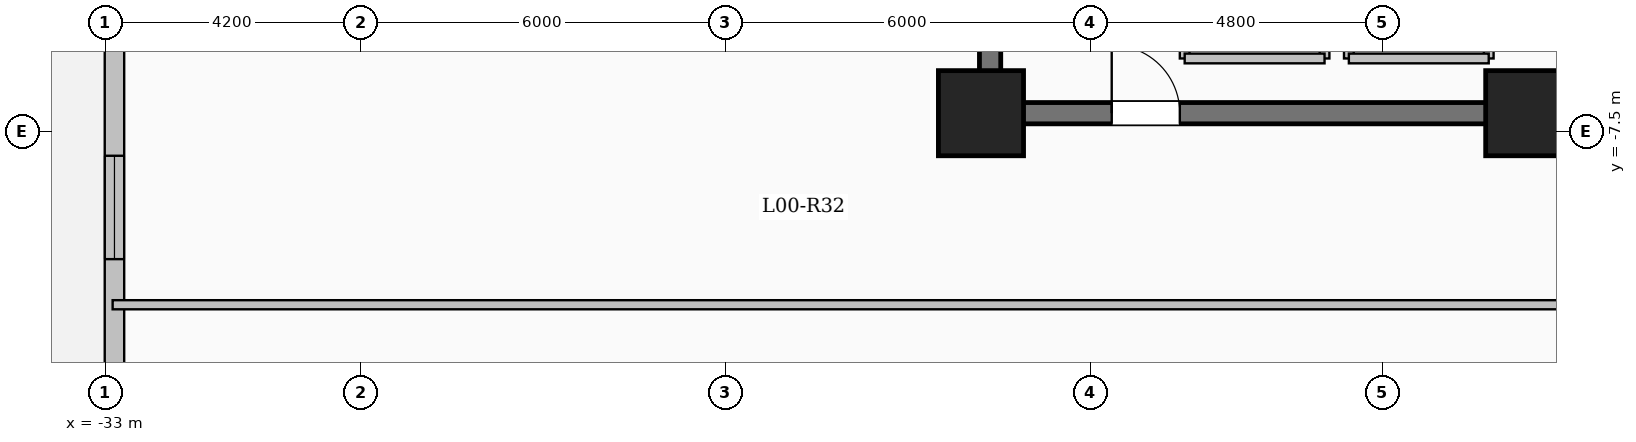
"""IFC4 building model, lengths in metres.
Left out: names, types, materials, properties, quantities, classifications, styles, units other than length and angle.
Written with IfcOpenShell. Run it as: python <this file> out.ifc"""

import sys

from ifc_helpers import new_model, si_unit, direction, frame, frame_2d, origin, origin_2d, place, context, subcontext, project, spatial, rectangle, extrude, element, fill, save


model = new_model("IFC4")
c1 = context("Model", 3, precision=1e-05, world=origin(), true_north=direction((0.0, 1.0)))
c2 = subcontext(c1, "Body", "Model", "MODEL_VIEW")
j1 = project(units=[si_unit("LENGTHUNIT", "METRE"), si_unit("PLANEANGLEUNIT", "RADIAN")], contexts=[c1])
p1 = place(None, origin())
s1 = spatial("IfcSite", under=j1, at=p1, CompositionType="ELEMENT")
p2 = place(p1, origin())
s2 = spatial("IfcBuilding", under=s1, at=p2, CompositionType="ELEMENT")
p3 = place(p2, origin())
s3 = spatial("IfcBuildingStorey", under=s2, at=p3, CompositionType="ELEMENT", Elevation=0.0)
for number, where, z_axis, x_axis in (
    (1, (-9.6, -7.2, 0.0), (0.0, 0.0, 1.0), (1.0, 0.0, 0.0)),
    (2, (-18.6, -7.2, 0.0), (0.0, 0.0, 1.0), (1.0, 0.0, 0.0)),
):
    element("IfcColumn", number, at=place(p3, frame(where, z_axis=z_axis, x_axis=x_axis)), inside=s3, PredefinedType="COLUMN", context=c2, shape_type="SweptSolid", body=[
        extrude(rectangle(XDim=1.4, YDim=1.4, at=origin_2d()), origin(), (0.0, 0.0, 1.0), 5.4),
    ])
p4 = place(p3, frame((-32.85, -29.85, 0.0), z_axis=(0.0, 0.0, 1.0), x_axis=(0.0, 1.0, 0.0)))
e3 = element("IfcWall", 3, at=p4, inside=s3, PredefinedType="SOLIDWALL", context=c2, shape_type="SweptSolid", body=[
    extrude(rectangle(XDim=59.7, YDim=0.32, at=frame_2d((29.85, 0.0))), origin(), (0.0, 0.0, 1.0), 5.1),
])
p5 = place(p4, frame((40.8, 0.0, 0.0)))
e4 = element("IfcOpeningElement", 4, at=p5, cuts=e3, PredefinedType="OPENING", context=c2, shape_type="SweptSolid", body=[
    extrude(rectangle(XDim=1.35, YDim=2.2, at=frame_2d((0.675, 1.1))), frame((0.0, 0.17, 0.0), z_axis=(0.0, -1.0, 0.0), x_axis=(1.0, 0.0, 0.0)), (0.0, 0.0, 1.0), 0.34),
])
p6 = place(p4, frame((0.55, 0.0, 0.0)))
e5 = element("IfcOpeningElement", 5, at=p6, cuts=e3, PredefinedType="OPENING", context=c2, shape_type="SweptSolid", body=[
    extrude(rectangle(XDim=6.4, YDim=3.5, at=frame_2d((3.2, 1.75))), frame((0.0, 0.17, 0.0), z_axis=(0.0, -1.0, 0.0), x_axis=(1.0, 0.0, 0.0)), (0.0, 0.0, 1.0), 0.34),
])
p7 = place(p4, frame((48.35, 0.0, 0.0)))
e6 = element("IfcOpeningElement", 6, at=p7, cuts=e3, PredefinedType="OPENING", context=c2, shape_type="SweptSolid", body=[
    extrude(rectangle(XDim=2.0, YDim=2.4, at=frame_2d((1.0, 1.2))), frame((0.0, 0.17, 0.0), z_axis=(0.0, -1.0, 0.0), x_axis=(1.0, 0.0, 0.0)), (0.0, 0.0, 1.0), 0.34),
])
p8 = place(p4, frame((20.25, 0.0, 0.9)))
e7 = element("IfcOpeningElement", 7, at=p8, cuts=e3, PredefinedType="OPENING", context=c2, shape_type="SweptSolid", body=[
    extrude(rectangle(XDim=1.7, YDim=1.9, at=frame_2d((0.85, 0.95))), frame((0.0, 0.17, 0.0), z_axis=(0.0, -1.0, 0.0), x_axis=(1.0, 0.0, 0.0)), (0.0, 0.0, 1.0), 0.34),
])
p9 = place(p4, frame((53.985, 0.0, 0.9)))
e8 = element("IfcOpeningElement", 8, at=p9, cuts=e3, PredefinedType="OPENING", context=c2, shape_type="SweptSolid", body=[
    extrude(rectangle(XDim=2.1, YDim=2.0, at=frame_2d((1.05, 1.0))), frame((0.0, 0.17, 0.0), z_axis=(0.0, -1.0, 0.0), x_axis=(1.0, 0.0, 0.0)), (0.0, 0.0, 1.0), 0.34),
])
p10 = place(p3, frame((-12.55, -6.3, 0.0), z_axis=(0.0, 0.0, 1.0), x_axis=(0.0, 1.0, 0.0)))
e9 = element("IfcWall", 9, at=p10, inside=s3, PredefinedType="SOLIDWALL", context=c2, shape_type="SweptSolid", body=[
    extrude(rectangle(XDim=2.6, YDim=0.16, at=frame_2d((1.3, 0.0))), origin(), (0.0, 0.0, 1.0), 5.1),
])
p11 = place(p3, frame((-10.25, -6.3, 0.0), z_axis=(0.0, 0.0, 1.0), x_axis=(0.0, 1.0, 0.0)))
e10 = element("IfcWall", 10, at=p11, inside=s3, PredefinedType="SOLIDWALL", context=c2, shape_type="SweptSolid", body=[
    extrude(rectangle(XDim=2.6, YDim=0.16, at=frame_2d((1.3, 0.0))), origin(), (0.0, 0.0, 1.0), 5.1),
])
p12 = place(p11, frame((0.75, 0.0, 0.0)))
e11 = element("IfcOpeningElement", 11, at=p12, cuts=e10, PredefinedType="OPENING", context=c2, shape_type="SweptSolid", body=[
    extrude(rectangle(XDim=1.1, YDim=2.15, at=frame_2d((0.55, 1.075))), frame((0.0, 0.09, 0.0), z_axis=(0.0, -1.0, 0.0), x_axis=(1.0, 0.0, 0.0)), (0.0, 0.0, 1.0), 0.18),
])
p13 = place(p3, frame((-12.55, -6.3, 0.0), z_axis=(0.0, 0.0, 1.0), x_axis=(1.0, 0.0, 0.0)))
e12 = element("IfcWall", 12, at=p13, inside=s3, PredefinedType="SOLIDWALL", context=c2, shape_type="SweptSolid", body=[
    extrude(rectangle(XDim=2.3, YDim=0.16, at=frame_2d((1.15, 0.0))), origin(), (0.0, 0.0, 1.0), 5.1),
])
p14 = place(p3, frame((-15.25, -6.3, 0.0), z_axis=(0.0, 0.0, 1.0), x_axis=(0.0, 1.0, 0.0)))
e13 = element("IfcWall", 13, at=p14, inside=s3, PredefinedType="SOLIDWALL", context=c2, shape_type="SweptSolid", body=[
    extrude(rectangle(XDim=2.6, YDim=0.16, at=frame_2d((1.3, 0.0))), origin(), (0.0, 0.0, 1.0), 5.1),
])
p15 = place(p14, frame((0.75, 0.0, 0.0)))
e14 = element("IfcOpeningElement", 14, at=p15, cuts=e13, PredefinedType="OPENING", context=c2, shape_type="SweptSolid", body=[
    extrude(rectangle(XDim=1.1, YDim=2.15, at=frame_2d((0.55, 1.075))), frame((0.0, 0.09, 0.0), z_axis=(0.0, -1.0, 0.0), x_axis=(1.0, 0.0, 0.0)), (0.0, 0.0, 1.0), 0.18),
])
p16 = place(p3, frame((-12.95, -6.3, 0.0), z_axis=(0.0, 0.0, 1.0), x_axis=(0.0, 1.0, 0.0)))
e15 = element("IfcWall", 15, at=p16, inside=s3, PredefinedType="SOLIDWALL", context=c2, shape_type="SweptSolid", body=[
    extrude(rectangle(XDim=2.6, YDim=0.16, at=frame_2d((1.3, 0.0))), origin(), (0.0, 0.0, 1.0), 5.1),
])
p17 = place(p3, frame((-15.25, -6.3, 0.0), z_axis=(0.0, 0.0, 1.0), x_axis=(1.0, 0.0, 0.0)))
e16 = element("IfcWall", 16, at=p17, inside=s3, PredefinedType="SOLIDWALL", context=c2, shape_type="SweptSolid", body=[
    extrude(rectangle(XDim=2.3, YDim=0.16, at=frame_2d((1.15, 0.0))), origin(), (0.0, 0.0, 1.0), 5.1),
])
p18 = place(p3, frame((-18.45, -7.375, 0.0), z_axis=(0.0, 0.0, 1.0), x_axis=(0.0, 1.0, 0.0)))
e17 = element("IfcWall", 17, at=p18, inside=s3, PredefinedType="SHEAR", context=c2, shape_type="SweptSolid", body=[
    extrude(rectangle(XDim=14.05, YDim=0.35, at=frame_2d((7.025, 0.0))), origin(), (0.0, 0.0, 1.0), 5.4),
])
p19 = place(p3, frame((-18.625, -7.2, 0.0), z_axis=(0.0, 0.0, 1.0), x_axis=(1.0, 0.0, 0.0)))
e18 = element("IfcWall", 18, at=p19, inside=s3, PredefinedType="SHEAR", context=c2, shape_type="SweptSolid", body=[
    extrude(rectangle(XDim=8.55, YDim=0.35, at=frame_2d((4.275, 0.0))), origin(), (0.0, 0.0, 1.0), 5.4),
])
p20 = place(p19, frame((2.175, 0.0, 0.0)))
e19 = element("IfcOpeningElement", 19, at=p20, cuts=e18, PredefinedType="OPENING", context=c2, shape_type="SweptSolid", body=[
    extrude(rectangle(XDim=1.12, YDim=2.15, at=frame_2d((0.56, 1.075))), frame((0.0, 0.185, 0.0), z_axis=(0.0, -1.0, 0.0), x_axis=(1.0, 0.0, 0.0)), (0.0, 0.0, 1.0), 0.37),
])
p21 = place(p3, frame((-32.88, -10.35, 0.0), z_axis=(0.0, 0.0, 1.0), x_axis=(1.0, 0.0, 0.0)))
e20 = element("IfcWall", 20, at=p21, inside=s3, PredefinedType="PARTITIONING", context=c2, shape_type="SweptSolid", body=[
    extrude(rectangle(XDim=24.33, YDim=0.15, at=frame_2d((12.165, 0.0))), origin(), (0.0, 0.0, 1.0), 5.1),
])
p22 = place(p8, origin())
e21 = element("IfcWindow", 21, at=p22, inside=s3, PartitioningType="SINGLE_PANEL", PredefinedType="WINDOW", context=c2, shape_type="SweptSolid", body=[
    extrude(rectangle(XDim=1.7, YDim=1.9, at=frame_2d((0.85, 0.95))), frame((0.0, 0.03, 0.0), z_axis=(0.0, -1.0, 0.0), x_axis=(1.0, 0.0, 0.0)), (0.0, 0.0, 1.0), 0.06),
])
fill(e7, e21)
p23 = place(p20, origin())
e22 = element("IfcDoor", 22, at=p23, inside=s3, OperationType="SINGLE_SWING_LEFT", PredefinedType="DOOR", context=c2, shape_type="SweptSolid", body=[
    extrude(rectangle(XDim=1.12, YDim=2.15, at=frame_2d((0.56, 1.075))), frame((0.0, 0.025, 0.0), z_axis=(0.0, -1.0, 0.0), x_axis=(1.0, 0.0, 0.0)), (0.0, 0.0, 1.0), 0.05),
])
fill(e19, e22)
save(model, sys.argv[1])
